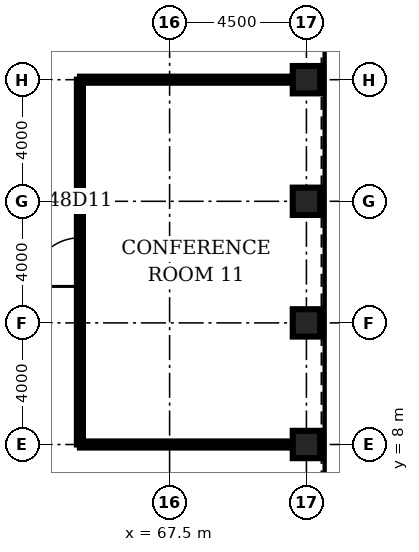
"""IFC4 building model, lengths in metres.
Left out: names, types, materials, properties, quantities, classifications, styles, units other than length and angle.
Written with IfcOpenShell. Run it as: python <this file> out.ifc"""

import sys

from ifc_helpers import new_model, si_unit, direction, frame, frame_2d, origin, origin_2d, place, context, subcontext, project, spatial, rectangle, hollow_rectangle, extrude, element, fill, save


model = new_model("IFC4")
c1 = context("Model", 3, precision=1e-05, world=origin(), true_north=direction((0.0, 1.0)))
c2 = subcontext(c1, "Body", "Model", "MODEL_VIEW")
j1 = project(units=[si_unit("LENGTHUNIT", "METRE"), si_unit("PLANEANGLEUNIT", "RADIAN")], contexts=[c1])
p1 = place(None, origin())
s1 = spatial("IfcSite", under=j1, at=p1, CompositionType="ELEMENT")
p2 = place(p1, origin())
s2 = spatial("IfcBuilding", under=s1, at=p2, CompositionType="ELEMENT")
p3 = place(p2, frame((0.0, 0.0, 215.2)))
s3 = spatial("IfcBuildingStorey", under=s2, at=p3, CompositionType="ELEMENT", Elevation=215.2)
for number, where, z_axis, x_axis in (
    (1, (72.0, 8.0, 0.0), (0.0, 0.0, 1.0), (1.0, 0.0, 0.0)),
    (2, (72.0, 12.0, 0.0), (0.0, 0.0, 1.0), (1.0, 0.0, 0.0)),
    (3, (72.0, 16.0, 0.0), (0.0, 0.0, 1.0), (1.0, 0.0, 0.0)),
    (4, (72.0, 20.0, 0.0), (0.0, 0.0, 1.0), (1.0, 0.0, 0.0)),
):
    element("IfcColumn", number, at=place(p3, frame(where, z_axis=z_axis, x_axis=x_axis)), inside=s3, PredefinedType="COLUMN", context=c2, shape_type="SweptSolid", body=[
        extrude(hollow_rectangle(XDim=0.9, YDim=0.9, WallThickness=0.08, at=origin_2d()), origin(), (0.0, 0.0, 1.0), 4.2),
    ])
for number, where, z_axis, x_axis in (
    (5, (64.55, 8.0, 0.0), (0.0, 0.0, 1.0), (1.0, 0.0, 0.0)),
    (6, (64.55, 20.0, 0.0), (0.0, 0.0, 1.0), (1.0, 0.0, 0.0)),
):
    element("IfcWall", number, at=place(p3, frame(where, z_axis=z_axis, x_axis=x_axis)), inside=s3, PredefinedType="PARTITIONING", context=c2, shape_type="SweptSolid", body=[
        extrude(rectangle(XDim=7.0, YDim=0.2, at=frame_2d((3.5, 0.0))), origin(), (0.0, 0.0, 1.0), 3.0),
    ])
p4 = place(p3, frame((64.55, 8.0, 0.0), z_axis=(0.0, 0.0, 1.0), x_axis=(0.0, 1.0, 0.0)))
e7 = element("IfcWall", 7, at=p4, inside=s3, PredefinedType="PARTITIONING", context=c2, shape_type="SweptSolid", body=[
    extrude(rectangle(XDim=12.0, YDim=0.2, at=frame_2d((6.0, 0.0))), origin(), (0.0, 0.0, 1.0), 3.0),
])
p5 = place(p4, frame((5.2, 0.0, 0.0)))
e8 = element("IfcOpeningElement", 8, at=p5, cuts=e7, PredefinedType="OPENING", context=c2, shape_type="SweptSolid", body=[
    extrude(rectangle(XDim=1.6, YDim=2.1, at=frame_2d((0.8, 1.05))), frame((0.0, 0.11, 0.0), z_axis=(0.0, -1.0, 0.0), x_axis=(1.0, 0.0, 0.0)), (0.0, 0.0, 1.0), 0.22),
])
p6 = place(p5, origin())
e9 = element("IfcDoor", 9, at=p6, inside=s3, OperationType="SINGLE_SWING_LEFT", PredefinedType="DOOR", context=c2, shape_type="SweptSolid", body=[
    extrude(rectangle(XDim=1.6, YDim=2.1, at=frame_2d((0.8, 1.05))), frame((0.0, 0.025, 0.0), z_axis=(0.0, -1.0, 0.0), x_axis=(1.0, 0.0, 0.0)), (0.0, 0.0, 1.0), 0.05),
])
fill(e8, e9)
save(model, sys.argv[1])
